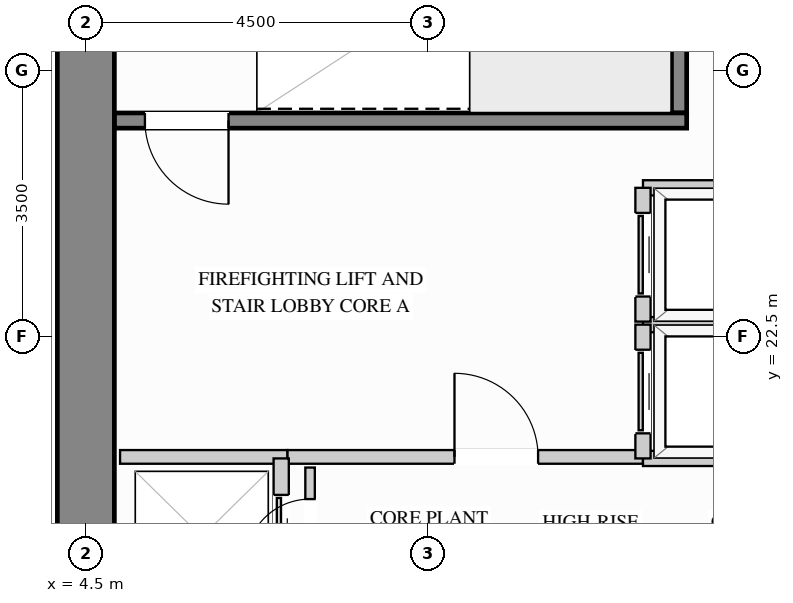
"""IFC4 building model, lengths in metres.
Left out: names, types, materials, properties, quantities, classifications, styles, units other than length and angle.
Written with IfcOpenShell. Run it as: python <this file> out.ifc"""

import sys

from ifc_helpers import new_model, si_unit, direction, frame, frame_2d, origin, place, context, subcontext, project, spatial, rectangle, extrude, source, transform, mapped, element, fill, save


model = new_model("IFC4")
c1 = context("Model", 3, precision=1e-05, world=origin(), true_north=direction((0.0, 1.0)))
c2 = subcontext(c1, "Body", "Model", "MODEL_VIEW")
j1 = project(units=[si_unit("LENGTHUNIT", "METRE"), si_unit("PLANEANGLEUNIT", "RADIAN")], contexts=[c1])
p1 = place(None, origin())
s1 = spatial("IfcSite", under=j1, at=p1, CompositionType="ELEMENT")
p2 = place(p1, origin())
s2 = spatial("IfcBuilding", under=s1, at=p2, CompositionType="ELEMENT")
p3 = place(p2, frame((0.0, 0.0, 120.6)))
s3 = spatial("IfcBuildingStorey", under=s2, at=p3, CompositionType="ELEMENT", Elevation=120.6)
m1 = source(origin(), c2, "Body", "SweptSolid", [
    extrude(rectangle(XDim=20.25, YDim=0.75, at=frame_2d((10.125, 0.0))), origin(), (0.0, 0.0, 1.0), 3.38),
])
p4 = place(p3, frame((4.5, 8.875, 0.0), z_axis=(0.0, 0.0, 1.0), x_axis=(0.0, 1.0, 0.0)))
e1 = element("IfcWall", 1, at=p4, inside=s3, PredefinedType="SHEAR", context=c2, shape_type="MappedRepresentation", body=[
    mapped(m1, transform((0.0, 0.0, 0.0), x_axis=(1.0, 0.0, 0.0), y_axis=(0.0, 1.0, 0.0), z_axis=(0.0, 0.0, 1.0))),
])
p5 = place(p3, frame((7.15, 20.92, 0.0), z_axis=(0.0, 0.0, 1.0), x_axis=(1.0, 0.0, 0.0)))
e2 = element("IfcWall", 2, at=p5, inside=s3, PredefinedType="PARTITIONING", context=c2, shape_type="SweptSolid", body=[
    extrude(rectangle(XDim=4.68, YDim=0.18, at=frame_2d((2.34, 0.0))), origin(), (0.0, 0.0, 1.0), 3.365),
])
p6 = place(p5, frame((2.2, 0.0, 0.0)))
e3 = element("IfcOpeningElement", 3, at=p6, cuts=e2, PredefinedType="OPENING", context=c2, shape_type="SweptSolid", body=[
    extrude(rectangle(XDim=1.1, YDim=2.15, at=frame_2d((0.55, 1.075))), frame((0.0, 0.1, 0.0), z_axis=(0.0, -1.0, 0.0), x_axis=(1.0, 0.0, 0.0)), (0.0, 0.0, 1.0), 0.2),
])
m2 = source(origin(), c2, "Body", "SweptSolid", [
    extrude(rectangle(XDim=2.2, YDim=0.18, at=frame_2d((1.1, 0.0))), origin(), (0.0, 0.0, 1.0), 3.365),
])
p7 = place(p3, frame((4.95, 20.92, 0.0), z_axis=(0.0, 0.0, 1.0), x_axis=(1.0, 0.0, 0.0)))
e4 = element("IfcWall", 4, at=p7, inside=s3, PredefinedType="PARTITIONING", context=c2, shape_type="MappedRepresentation", body=[
    mapped(m2, transform((0.0, 0.0, 0.0), x_axis=(1.0, 0.0, 0.0), y_axis=(0.0, 1.0, 0.0), z_axis=(0.0, 0.0, 1.0))),
])
p8 = place(p3, frame((7.45, 19.2, 0.0), z_axis=(0.0, 0.0, 1.0), x_axis=(0.0, 1.0, 0.0)))
e5 = element("IfcWall", 5, at=p8, inside=s3, PredefinedType="PARTITIONING", context=c2, shape_type="SweptSolid", body=[
    extrude(rectangle(XDim=1.58, YDim=0.125, at=frame_2d((0.79, 0.0))), origin(), (0.0, 0.0, 1.0), 3.365),
])
p9 = place(p8, frame((0.315, 0.0, 0.0)))
e6 = element("IfcOpeningElement", 6, at=p9, cuts=e5, PredefinedType="OPENING", context=c2, shape_type="SweptSolid", body=[
    extrude(rectangle(XDim=0.85, YDim=2.1, at=frame_2d((0.425, 1.05))), frame((0.0, 0.073, 0.0), z_axis=(0.0, -1.0, 0.0), x_axis=(1.0, 0.0, 0.0)), (0.0, 0.0, 1.0), 0.145),
])
m3 = source(origin(), c2, "Body", "SweptSolid", [
    extrude(rectangle(XDim=2.265, YDim=0.2, at=frame_2d((1.132, 0.0))), origin(), (0.0, 0.0, 1.0), 3.365),
])
for number, where, z_axis, x_axis in (
    (7, (11.83, 22.66, 0.0), (0.0, 0.0, 1.0), (1.0, 0.0, 0.0)),
    (8, (11.83, 20.9, 0.0), (0.0, 0.0, 1.0), (1.0, 0.0, 0.0)),
):
    element("IfcWall", number, at=place(p3, frame(where, z_axis=z_axis, x_axis=x_axis)), inside=s3, PredefinedType="PARTITIONING", context=c2, shape_type="MappedRepresentation", body=[
        mapped(m3, transform((0.0, 0.0, 0.0), x_axis=(1.0, 0.0, 0.0), y_axis=(0.0, 1.0, 0.0), z_axis=(0.0, 0.0, 1.0))),
    ])
p10 = place(p3, frame((11.83, 20.9, 0.0), z_axis=(0.0, 0.0, 1.0), x_axis=(0.0, 1.0, 0.0)))
e9 = element("IfcWall", 9, at=p10, inside=s3, PredefinedType="PARTITIONING", context=c2, shape_type="SweptSolid", body=[
    extrude(rectangle(XDim=1.76, YDim=0.2, at=frame_2d((0.88, 0.0))), origin(), (0.0, 0.0, 1.0), 3.365),
])
p11 = place(p10, frame((0.33, 0.0, 0.0)))
e10 = element("IfcOpeningElement", 10, at=p11, cuts=e9, PredefinedType="OPENING", context=c2, shape_type="SweptSolid", body=[
    extrude(rectangle(XDim=1.1, YDim=2.2, at=frame_2d((0.55, 1.1))), frame((0.0, 0.11, 0.0), z_axis=(0.0, -1.0, 0.0), x_axis=(1.0, 0.0, 0.0)), (0.0, 0.0, 1.0), 0.22),
])
p12 = place(p3, frame((11.83, 24.46, 0.0), z_axis=(0.0, 0.0, 1.0), x_axis=(1.0, 0.0, 0.0)))
e11 = element("IfcWall", 11, at=p12, inside=s3, PredefinedType="PARTITIONING", context=c2, shape_type="MappedRepresentation", body=[
    mapped(m3, transform((0.0, 0.0, 0.0), x_axis=(1.0, 0.0, 0.0), y_axis=(0.0, 1.0, 0.0), z_axis=(0.0, 0.0, 1.0))),
])
p13 = place(p3, frame((11.83, 22.7, 0.0), z_axis=(0.0, 0.0, 1.0), x_axis=(0.0, 1.0, 0.0)))
e12 = element("IfcWall", 12, at=p13, inside=s3, PredefinedType="PARTITIONING", context=c2, shape_type="SweptSolid", body=[
    extrude(rectangle(XDim=1.76, YDim=0.2, at=frame_2d((0.88, 0.0))), origin(), (0.0, 0.0, 1.0), 3.365),
])
p14 = place(p13, frame((0.33, 0.0, 0.0)))
e13 = element("IfcOpeningElement", 13, at=p14, cuts=e12, PredefinedType="OPENING", context=c2, shape_type="SweptSolid", body=[
    extrude(rectangle(XDim=1.1, YDim=2.2, at=frame_2d((0.55, 1.1))), frame((0.0, 0.11, 0.0), z_axis=(0.0, -1.0, 0.0), x_axis=(1.0, 0.0, 0.0)), (0.0, 0.0, 1.0), 0.22),
])
p15 = place(p3, frame((7.07, 18.84, 0.0), z_axis=(0.0, 0.0, 1.0), x_axis=(0.0, 1.0, 0.0)))
e14 = element("IfcWall", 14, at=p15, inside=s3, PredefinedType="PARTITIONING", context=c2, shape_type="SweptSolid", body=[
    extrude(rectangle(XDim=2.06, YDim=0.2, at=frame_2d((1.03, 0.0))), origin(), (0.0, 0.0, 1.0), 3.365),
])
p16 = place(p15, frame((0.48, 0.0, 0.0)))
e15 = element("IfcOpeningElement", 15, at=p16, cuts=e14, PredefinedType="OPENING", context=c2, shape_type="SweptSolid", body=[
    extrude(rectangle(XDim=1.1, YDim=2.2, at=frame_2d((0.55, 1.1))), frame((0.0, 0.11, 0.0), z_axis=(0.0, -1.0, 0.0), x_axis=(1.0, 0.0, 0.0)), (0.0, 0.0, 1.0), 0.22),
])
m4 = source(origin(), c2, "Body", "SweptSolid", [
    extrude(rectangle(XDim=3.678, YDim=0.2, at=frame_2d((1.839, 0.0))), origin(), (0.0, 0.0, 1.0), 3.38),
])
p17 = place(p3, frame((12.305, 25.445, 0.0), z_axis=(0.0, 0.0, 1.0), x_axis=(0.0, 1.0, 0.0)))
e16 = element("IfcWall", 16, at=p17, inside=s3, PredefinedType="SHEAR", context=c2, shape_type="MappedRepresentation", body=[
    mapped(m4, transform((0.0, 0.0, 0.0), x_axis=(1.0, 0.0, 0.0), y_axis=(0.0, 1.0, 0.0), z_axis=(0.0, 0.0, 1.0))),
])
p18 = place(p3, frame((4.877, 25.345, 0.0), z_axis=(0.0, 0.0, 1.0), x_axis=(1.0, 0.0, 0.0)))
e17 = element("IfcWall", 17, at=p18, inside=s3, PredefinedType="SHEAR", context=c2, shape_type="SweptSolid", body=[
    extrude(rectangle(XDim=7.528, YDim=0.2, at=frame_2d((3.764, 0.0))), origin(), (0.0, 0.0, 1.0), 3.38),
])
p19 = place(p18, frame((0.4, 0.0, 0.0)))
e18 = element("IfcOpeningElement", 18, at=p19, cuts=e17, PredefinedType="OPENING", context=c2, shape_type="SweptSolid", body=[
    extrude(rectangle(XDim=1.1, YDim=2.15, at=frame_2d((0.55, 1.075))), frame((0.0, 0.11, 0.0), z_axis=(0.0, -1.0, 0.0), x_axis=(1.0, 0.0, 0.0)), (0.0, 0.0, 1.0), 0.22),
])
m5 = source(origin(), c2, "Body", "SweptSolid", [
    extrude(rectangle(XDim=1.1, YDim=2.15, at=frame_2d((0.55, 1.075))), frame((0.0, 0.025, 0.0), z_axis=(0.0, -1.0, 0.0), x_axis=(1.0, 0.0, 0.0)), (0.0, 0.0, 1.0), 0.05),
])
p20 = place(p6, origin())
e19 = element("IfcDoor", 19, at=p20, inside=s3, OperationType="SINGLE_SWING_LEFT", PredefinedType="DOOR", context=c2, shape_type="MappedRepresentation", body=[
    mapped(m5, transform((0.0, 0.0, 0.0), x_axis=(1.0, 0.0, 0.0), y_axis=(0.0, 1.0, 0.0), z_axis=(0.0, 0.0, 1.0))),
])
fill(e3, e19)
m6 = source(origin(), c2, "Body", "SweptSolid", [
    extrude(rectangle(XDim=1.1, YDim=2.2, at=frame_2d((0.55, 1.1))), frame((0.0, 0.025, 0.0), z_axis=(0.0, -1.0, 0.0), x_axis=(1.0, 0.0, 0.0)), (0.0, 0.0, 1.0), 0.05),
])
p21 = place(p11, origin())
e20 = element("IfcDoor", 20, at=p21, inside=s3, OperationType="SLIDING_TO_LEFT", PredefinedType="DOOR", context=c2, shape_type="MappedRepresentation", body=[
    mapped(m6, transform((0.0, 0.0, 0.0), x_axis=(1.0, 0.0, 0.0), y_axis=(0.0, 1.0, 0.0), z_axis=(0.0, 0.0, 1.0))),
])
fill(e10, e20)
p22 = place(p14, origin())
e21 = element("IfcDoor", 21, at=p22, inside=s3, OperationType="SLIDING_TO_LEFT", PredefinedType="DOOR", context=c2, shape_type="MappedRepresentation", body=[
    mapped(m6, transform((0.0, 0.0, 0.0), x_axis=(1.0, 0.0, 0.0), y_axis=(0.0, 1.0, 0.0), z_axis=(0.0, 0.0, 1.0))),
])
fill(e13, e21)
p23 = place(p16, origin())
e22 = element("IfcDoor", 22, at=p23, inside=s3, OperationType="SLIDING_TO_LEFT", PredefinedType="DOOR", context=c2, shape_type="MappedRepresentation", body=[
    mapped(m6, transform((0.0, 0.0, 0.0), x_axis=(1.0, 0.0, 0.0), y_axis=(0.0, 1.0, 0.0), z_axis=(0.0, 0.0, 1.0))),
])
fill(e15, e22)
m7 = source(origin(), c2, "Body", "SweptSolid", [
    extrude(rectangle(XDim=0.85, YDim=2.1, at=frame_2d((0.425, 1.05))), frame((0.0, 0.025, 0.0), z_axis=(0.0, -1.0, 0.0), x_axis=(1.0, 0.0, 0.0)), (0.0, 0.0, 1.0), 0.05),
])
p24 = place(p9, origin())
e23 = element("IfcDoor", 23, at=p24, inside=s3, OperationType="SINGLE_SWING_LEFT", PredefinedType="DOOR", context=c2, shape_type="MappedRepresentation", body=[
    mapped(m7, transform((0.0, 0.0, 0.0), x_axis=(1.0, 0.0, 0.0), y_axis=(0.0, 1.0, 0.0), z_axis=(0.0, 0.0, 1.0))),
])
fill(e6, e23)
m8 = source(origin(), c2, "Body", "SweptSolid", [
    extrude(rectangle(XDim=1.1, YDim=2.15, at=frame_2d((0.55, 1.075))), frame((0.0, 0.025, 0.0), z_axis=(0.0, -1.0, 0.0), x_axis=(1.0, 0.0, 0.0)), (0.0, 0.0, 1.0), 0.05),
])
p25 = place(p19, origin())
e24 = element("IfcDoor", 24, at=p25, inside=s3, OperationType="SINGLE_SWING_RIGHT", PredefinedType="DOOR", context=c2, shape_type="MappedRepresentation", body=[
    mapped(m8, transform((0.0, 0.0, 0.0), x_axis=(1.0, 0.0, 0.0), y_axis=(0.0, 1.0, 0.0), z_axis=(0.0, 0.0, 1.0))),
])
fill(e18, e24)
save(model, sys.argv[1])
